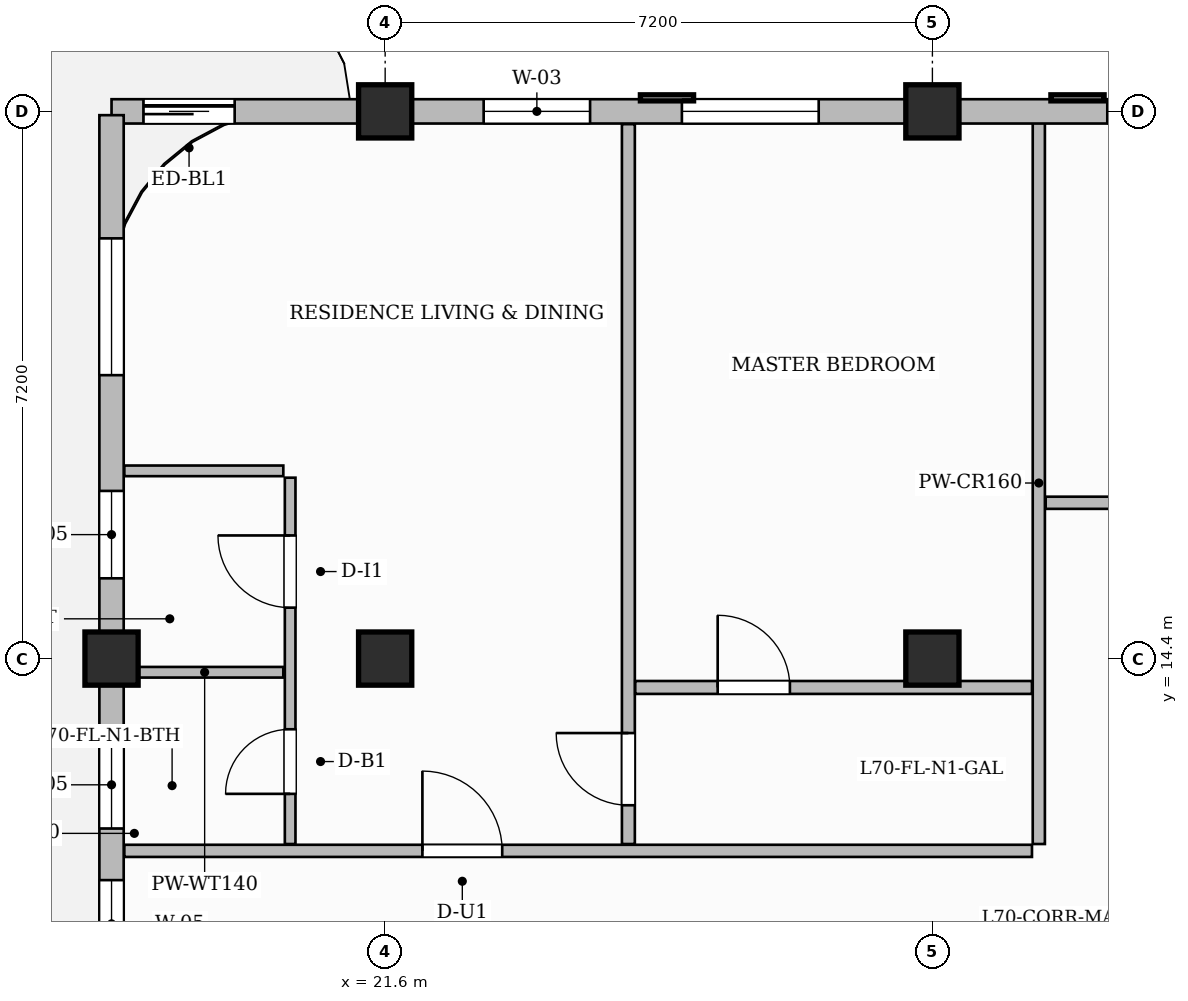
"""IFC4 building model, lengths in metres.
Left out: names, types, materials, properties, quantities, classifications, styles, units other than length and angle.
Written with IfcOpenShell. Run it as: python <this file> out.ifc"""

import sys

from ifc_helpers import new_model, si_unit, direction, frame, frame_2d, origin, origin_2d, place, context, subcontext, project, spatial, rectangle, extrude, source, transform, mapped, element, fill, save


model = new_model("IFC4")
c1 = context("Model", 3, precision=1e-05, world=origin(), true_north=direction((0.0, 1.0)))
c2 = subcontext(c1, "Body", "Model", "MODEL_VIEW")
j1 = project(units=[si_unit("LENGTHUNIT", "METRE"), si_unit("PLANEANGLEUNIT", "RADIAN")], contexts=[c1])
p1 = place(None, origin())
s1 = spatial("IfcSite", under=j1, at=p1, CompositionType="ELEMENT")
p2 = place(p1, origin())
s2 = spatial("IfcBuilding", under=s1, at=p2, CompositionType="ELEMENT")
p3 = place(p2, frame((0.0, 0.0, 278.9)))
s3 = spatial("IfcBuildingStorey", under=s2, at=p3, CompositionType="ELEMENT", Elevation=278.9)
m1 = source(origin(), c2, "Body", "SweptSolid", [
    extrude(rectangle(XDim=0.7, YDim=0.7, at=origin_2d()), origin(), (0.0, 0.0, 1.0), 3.85),
])
for number, where, z_axis, x_axis in (
    (1, (21.6, 14.4, 0.0), (0.0, 0.0, 1.0), (1.0, 0.0, 0.0)),
    (2, (21.6, 21.6, 0.0), (0.0, 0.0, 1.0), (1.0, 0.0, 0.0)),
    (3, (28.8, 14.4, 0.0), (0.0, 0.0, 1.0), (1.0, 0.0, 0.0)),
    (4, (28.8, 21.6, 0.0), (0.0, 0.0, 1.0), (1.0, 0.0, 0.0)),
    (5, (18.0, 14.4, 0.0), (0.0, 0.0, 1.0), (1.0, 0.0, 0.0)),
):
    element("IfcColumn", number, at=place(p3, frame(where, z_axis=z_axis, x_axis=x_axis)), inside=s3, PredefinedType="COLUMN", context=c2, shape_type="MappedRepresentation", body=[
        mapped(m1, transform((0.0, 0.0, 0.0), scale=1.0)),
    ])
p4 = place(p3, frame((18.168, 11.87, 0.0), z_axis=(0.0, 0.0, 1.0), x_axis=(1.0, 0.0, 0.0)))
e6 = element("IfcWall", 6, at=p4, inside=s3, PredefinedType="PARTITIONING", context=c2, shape_type="SweptSolid", body=[
    extrude(rectangle(XDim=11.942, YDim=0.16, at=frame_2d((5.971, 0.0))), origin(), (0.0, 0.0, 1.0), 3.6),
])
p5 = place(p4, frame((3.922, 0.0, 0.0)))
e7 = element("IfcOpeningElement", 7, at=p5, cuts=e6, PredefinedType="OPENING", context=c2, shape_type="SweptSolid", body=[
    extrude(rectangle(XDim=1.05, YDim=2.25, at=frame_2d((0.525, 1.125))), frame((0.0, 0.09, 0.0), z_axis=(0.0, -1.0, 0.0), x_axis=(1.0, 0.0, 0.0)), (0.0, 0.0, 1.0), 0.18),
])
p6 = place(p3, frame((30.2, 11.96, 0.0), z_axis=(0.0, 0.0, 1.0), x_axis=(0.0, 1.0, 0.0)))
e8 = element("IfcWall", 8, at=p6, inside=s3, PredefinedType="PARTITIONING", context=c2, shape_type="SweptSolid", body=[
    extrude(rectangle(XDim=9.5, YDim=0.16, at=frame_2d((4.75, 0.0))), origin(), (0.0, 0.0, 1.0), 3.6),
])
p7 = place(p3, frame((30.29, 16.45, 0.0), z_axis=(0.0, 0.0, 1.0), x_axis=(1.0, 0.0, 0.0)))
e9 = element("IfcWall", 9, at=p7, inside=s3, PredefinedType="PARTITIONING", context=c2, shape_type="SweptSolid", body=[
    extrude(rectangle(XDim=19.37, YDim=0.16, at=frame_2d((9.685, 0.0))), origin(), (0.0, 0.0, 1.0), 3.6),
])
p8 = place(p7, frame((1.285, 0.0, 0.0)))
e10 = element("IfcOpeningElement", 10, at=p8, cuts=e9, PredefinedType="OPENING", context=c2, shape_type="SweptSolid", body=[
    extrude(rectangle(XDim=0.85, YDim=2.1, at=frame_2d((0.425, 1.05))), frame((0.0, 0.09, 0.0), z_axis=(0.0, -1.0, 0.0), x_axis=(1.0, 0.0, 0.0)), (0.0, 0.0, 1.0), 0.18),
])
p9 = place(p7, frame((10.66, 0.0, 0.0)))
e11 = element("IfcOpeningElement", 11, at=p9, cuts=e9, PredefinedType="OPENING", context=c2, shape_type="SweptSolid", body=[
    extrude(rectangle(XDim=1.6, YDim=2.4, at=frame_2d((0.8, 1.2))), frame((0.0, 0.09, 0.0), z_axis=(0.0, -1.0, 0.0), x_axis=(1.0, 0.0, 0.0)), (0.0, 0.0, 1.0), 0.18),
])
p10 = place(p3, frame((20.35, 11.96, 0.0), z_axis=(0.0, 0.0, 1.0), x_axis=(0.0, 1.0, 0.0)))
e12 = element("IfcWall", 12, at=p10, inside=s3, PredefinedType="PARTITIONING", context=c2, shape_type="SweptSolid", body=[
    extrude(rectangle(XDim=4.82, YDim=0.14, at=frame_2d((2.41, 0.0))), origin(), (0.0, 0.0, 1.0), 3.6),
])
p11 = place(p10, frame((0.66, 0.0, 0.0)))
e13 = element("IfcOpeningElement", 13, at=p11, cuts=e12, PredefinedType="OPENING", context=c2, shape_type="SweptSolid", body=[
    extrude(rectangle(XDim=0.85, YDim=2.1, at=frame_2d((0.425, 1.05))), frame((0.0, 0.08, 0.0), z_axis=(0.0, -1.0, 0.0), x_axis=(1.0, 0.0, 0.0)), (0.0, 0.0, 1.0), 0.16),
])
p12 = place(p10, frame((3.11, 0.0, 0.0)))
e14 = element("IfcOpeningElement", 14, at=p12, cuts=e12, PredefinedType="OPENING", context=c2, shape_type="SweptSolid", body=[
    extrude(rectangle(XDim=0.95, YDim=2.15, at=frame_2d((0.475, 1.075))), frame((0.0, 0.08, 0.0), z_axis=(0.0, -1.0, 0.0), x_axis=(1.0, 0.0, 0.0)), (0.0, 0.0, 1.0), 0.16),
])
p13 = place(p3, frame((18.19, 14.22, 0.0), z_axis=(0.0, 0.0, 1.0), x_axis=(1.0, 0.0, 0.0)))
e15 = element("IfcWall", 15, at=p13, inside=s3, PredefinedType="PARTITIONING", context=c2, shape_type="SweptSolid", body=[
    extrude(rectangle(XDim=2.07, YDim=0.14, at=frame_2d((1.035, 0.0))), origin(), (0.0, 0.0, 1.0), 3.185),
])
p14 = place(p3, frame((18.168, 16.87, 0.0), z_axis=(0.0, 0.0, 1.0), x_axis=(1.0, 0.0, 0.0)))
e16 = element("IfcWall", 16, at=p14, inside=s3, PredefinedType="PARTITIONING", context=c2, shape_type="SweptSolid", body=[
    extrude(rectangle(XDim=2.092, YDim=0.14, at=frame_2d((1.046, 0.0))), origin(), (0.0, 0.0, 1.0), 3.6),
])
p15 = place(p3, frame((24.8, 11.96, 0.0), z_axis=(0.0, 0.0, 1.0), x_axis=(0.0, 1.0, 0.0)))
e17 = element("IfcWall", 17, at=p15, inside=s3, PredefinedType="PARTITIONING", context=c2, shape_type="SweptSolid", body=[
    extrude(rectangle(XDim=9.472, YDim=0.17, at=frame_2d((4.736, 0.0))), origin(), (0.0, 0.0, 1.0), 3.6),
])
p16 = place(p15, frame((0.51, 0.0, 0.0)))
e18 = element("IfcOpeningElement", 18, at=p16, cuts=e17, PredefinedType="OPENING", context=c2, shape_type="SweptSolid", body=[
    extrude(rectangle(XDim=0.95, YDim=2.15, at=frame_2d((0.475, 1.075))), frame((0.0, 0.095, 0.0), z_axis=(0.0, -1.0, 0.0), x_axis=(1.0, 0.0, 0.0)), (0.0, 0.0, 1.0), 0.19),
])
p17 = place(p3, frame((24.89, 14.02, 0.0), z_axis=(0.0, 0.0, 1.0), x_axis=(1.0, 0.0, 0.0)))
e19 = element("IfcWall", 19, at=p17, inside=s3, PredefinedType="PARTITIONING", context=c2, shape_type="SweptSolid", body=[
    extrude(rectangle(XDim=5.22, YDim=0.17, at=frame_2d((2.61, 0.0))), origin(), (0.0, 0.0, 1.0), 3.6),
])
p18 = place(p17, frame((1.085, 0.0, 0.0)))
e20 = element("IfcOpeningElement", 20, at=p18, cuts=e19, PredefinedType="OPENING", context=c2, shape_type="SweptSolid", body=[
    extrude(rectangle(XDim=0.95, YDim=2.15, at=frame_2d((0.475, 1.075))), frame((0.0, 0.095, 0.0), z_axis=(0.0, -1.0, 0.0), x_axis=(1.0, 0.0, 0.0)), (0.0, 0.0, 1.0), 0.19),
])
p19 = place(p3, frame((18.0, 21.6, 0.0), z_axis=(0.0, 0.0, 1.0), x_axis=(1.0, 0.0, 0.0)))
e21 = element("IfcWall", 21, at=p19, inside=s3, PredefinedType="SOLIDWALL", context=c2, shape_type="SweptSolid", body=[
    extrude(rectangle(XDim=31.8, YDim=0.32, at=frame_2d((15.9, 0.0))), origin(), (0.0, 0.0, 1.0), 3.185),
])
p20 = place(p19, frame((0.42, 0.0, 0.0)))
e22 = element("IfcOpeningElement", 22, at=p20, cuts=e21, PredefinedType="OPENING", context=c2, shape_type="SweptSolid", body=[
    extrude(rectangle(XDim=1.2, YDim=2.2, at=frame_2d((0.6, 1.1))), frame((0.0, 0.17, 0.0), z_axis=(0.0, -1.0, 0.0), x_axis=(1.0, 0.0, 0.0)), (0.0, 0.0, 1.0), 0.34),
])
p21 = place(p19, frame((4.896, 0.0, 0.8)))
e23 = element("IfcOpeningElement", 23, at=p21, cuts=e21, PredefinedType="OPENING", context=c2, shape_type="SweptSolid", body=[
    extrude(rectangle(XDim=1.4, YDim=1.85, at=frame_2d((0.7, 0.925))), frame((0.0, 0.17, 0.0), z_axis=(0.0, -1.0, 0.0), x_axis=(1.0, 0.0, 0.0)), (0.0, 0.0, 1.0), 0.34),
])
p22 = place(p19, frame((7.504, 0.0, 0.8)))
e24 = element("IfcOpeningElement", 24, at=p22, cuts=e21, PredefinedType="OPENING", context=c2, shape_type="SweptSolid", body=[
    extrude(rectangle(XDim=1.8, YDim=1.85, at=frame_2d((0.9, 0.925))), frame((0.0, 0.17, 0.0), z_axis=(0.0, -1.0, 0.0), x_axis=(1.0, 0.0, 0.0)), (0.0, 0.0, 1.0), 0.34),
])
p23 = place(p19, frame((13.101, 0.0, 0.8)))
e25 = element("IfcOpeningElement", 25, at=p23, cuts=e21, PredefinedType="OPENING", context=c2, shape_type="SweptSolid", body=[
    extrude(rectangle(XDim=1.8, YDim=1.85, at=frame_2d((0.9, 0.925))), frame((0.0, 0.17, 0.0), z_axis=(0.0, -1.0, 0.0), x_axis=(1.0, 0.0, 0.0)), (0.0, 0.0, 1.0), 0.34),
])
p24 = place(p19, frame((18.125, 0.0, 0.8)))
e26 = element("IfcOpeningElement", 26, at=p24, cuts=e21, PredefinedType="OPENING", context=c2, shape_type="SweptSolid", body=[
    extrude(rectangle(XDim=1.8, YDim=1.85, at=frame_2d((0.9, 0.925))), frame((0.0, 0.17, 0.0), z_axis=(0.0, -1.0, 0.0), x_axis=(1.0, 0.0, 0.0)), (0.0, 0.0, 1.0), 0.34),
])
p25 = place(p19, frame((20.875, 0.0, 0.8)))
e27 = element("IfcOpeningElement", 27, at=p25, cuts=e21, PredefinedType="OPENING", context=c2, shape_type="SweptSolid", body=[
    extrude(rectangle(XDim=1.8, YDim=1.85, at=frame_2d((0.9, 0.925))), frame((0.0, 0.17, 0.0), z_axis=(0.0, -1.0, 0.0), x_axis=(1.0, 0.0, 0.0)), (0.0, 0.0, 1.0), 0.34),
])
p26 = place(p19, frame((25.475, 0.0, 0.8)))
e28 = element("IfcOpeningElement", 28, at=p26, cuts=e21, PredefinedType="OPENING", context=c2, shape_type="SweptSolid", body=[
    extrude(rectangle(XDim=1.8, YDim=1.85, at=frame_2d((0.9, 0.925))), frame((0.0, 0.17, 0.0), z_axis=(0.0, -1.0, 0.0), x_axis=(1.0, 0.0, 0.0)), (0.0, 0.0, 1.0), 0.34),
])
p27 = place(p19, frame((28.525, 0.0, 0.8)))
e29 = element("IfcOpeningElement", 29, at=p27, cuts=e21, PredefinedType="OPENING", context=c2, shape_type="SweptSolid", body=[
    extrude(rectangle(XDim=1.8, YDim=1.85, at=frame_2d((0.9, 0.925))), frame((0.0, 0.17, 0.0), z_axis=(0.0, -1.0, 0.0), x_axis=(1.0, 0.0, 0.0)), (0.0, 0.0, 1.0), 0.34),
])
p28 = place(p3, frame((18.0, 0.05, 0.0), z_axis=(0.0, 0.0, 1.0), x_axis=(0.0, 1.0, 0.0)))
e30 = element("IfcWall", 30, at=p28, inside=s3, PredefinedType="SOLIDWALL", context=c2, shape_type="SweptSolid", body=[
    extrude(rectangle(XDim=21.5, YDim=0.32, at=frame_2d((10.75, 0.0))), origin(), (0.0, 0.0, 1.0), 3.6),
])
p29 = place(p28, frame((0.99, 0.0, 0.8)))
e31 = element("IfcOpeningElement", 31, at=p29, cuts=e30, PredefinedType="OPENING", context=c2, shape_type="SweptSolid", body=[
    extrude(rectangle(XDim=1.8, YDim=1.85, at=frame_2d((0.9, 0.925))), frame((0.0, 0.17, 0.0), z_axis=(0.0, -1.0, 0.0), x_axis=(1.0, 0.0, 0.0)), (0.0, 0.0, 1.0), 0.34),
])
p30 = place(p28, frame((3.93, 0.0, 0.8)))
e32 = element("IfcOpeningElement", 32, at=p30, cuts=e30, PredefinedType="OPENING", context=c2, shape_type="SweptSolid", body=[
    extrude(rectangle(XDim=1.8, YDim=1.85, at=frame_2d((0.9, 0.925))), frame((0.0, 0.17, 0.0), z_axis=(0.0, -1.0, 0.0), x_axis=(1.0, 0.0, 0.0)), (0.0, 0.0, 1.0), 0.34),
])
p31 = place(p28, frame((8.346, 0.0, 0.8)))
e33 = element("IfcOpeningElement", 33, at=p31, cuts=e30, PredefinedType="OPENING", context=c2, shape_type="SweptSolid", body=[
    extrude(rectangle(XDim=1.15, YDim=1.8, at=frame_2d((0.575, 0.9))), frame((0.0, 0.17, 0.0), z_axis=(0.0, -1.0, 0.0), x_axis=(1.0, 0.0, 0.0)), (0.0, 0.0, 1.0), 0.34),
])
p32 = place(p28, frame((10.285, 0.0, 0.8)))
e34 = element("IfcOpeningElement", 34, at=p32, cuts=e30, PredefinedType="OPENING", context=c2, shape_type="SweptSolid", body=[
    extrude(rectangle(XDim=1.15, YDim=1.8, at=frame_2d((0.575, 0.9))), frame((0.0, 0.17, 0.0), z_axis=(0.0, -1.0, 0.0), x_axis=(1.0, 0.0, 0.0)), (0.0, 0.0, 1.0), 0.34),
])
p33 = place(p28, frame((12.114, 0.0, 0.8)))
e35 = element("IfcOpeningElement", 35, at=p33, cuts=e30, PredefinedType="OPENING", context=c2, shape_type="SweptSolid", body=[
    extrude(rectangle(XDim=1.15, YDim=1.8, at=frame_2d((0.575, 0.9))), frame((0.0, 0.17, 0.0), z_axis=(0.0, -1.0, 0.0), x_axis=(1.0, 0.0, 0.0)), (0.0, 0.0, 1.0), 0.34),
])
p34 = place(p28, frame((15.406, 0.0, 0.8)))
e36 = element("IfcOpeningElement", 36, at=p34, cuts=e30, PredefinedType="OPENING", context=c2, shape_type="SweptSolid", body=[
    extrude(rectangle(XDim=1.15, YDim=1.8, at=frame_2d((0.575, 0.9))), frame((0.0, 0.17, 0.0), z_axis=(0.0, -1.0, 0.0), x_axis=(1.0, 0.0, 0.0)), (0.0, 0.0, 1.0), 0.34),
])
p35 = place(p28, frame((18.079, 0.0, 0.8)))
e37 = element("IfcOpeningElement", 37, at=p35, cuts=e30, PredefinedType="OPENING", context=c2, shape_type="SweptSolid", body=[
    extrude(rectangle(XDim=1.8, YDim=1.85, at=frame_2d((0.9, 0.925))), frame((0.0, 0.17, 0.0), z_axis=(0.0, -1.0, 0.0), x_axis=(1.0, 0.0, 0.0)), (0.0, 0.0, 1.0), 0.34),
])
m2 = source(origin(), c2, "Body", "SweptSolid", [
    extrude(rectangle(XDim=0.85, YDim=2.1, at=frame_2d((0.425, 1.05))), frame((0.0, 0.025, 0.0), z_axis=(0.0, -1.0, 0.0), x_axis=(1.0, 0.0, 0.0)), (0.0, 0.0, 1.0), 0.05),
])
p36 = place(p11, origin())
e38 = element("IfcDoor", 38, at=p36, inside=s3, OperationType="SINGLE_SWING_LEFT", PredefinedType="DOOR", context=c2, shape_type="MappedRepresentation", body=[
    mapped(m2, transform((0.0, 0.0, 0.0), scale=1.0)),
])
fill(e13, e38)
m3 = source(origin(), c2, "Body", "SweptSolid", [
    extrude(rectangle(XDim=0.95, YDim=2.15, at=frame_2d((0.475, 1.075))), frame((0.0, 0.025, 0.0), z_axis=(0.0, -1.0, 0.0), x_axis=(1.0, 0.0, 0.0)), (0.0, 0.0, 1.0), 0.05),
])
p37 = place(p12, origin())
e39 = element("IfcDoor", 39, at=p37, inside=s3, OperationType="SINGLE_SWING_RIGHT", PredefinedType="DOOR", context=c2, shape_type="MappedRepresentation", body=[
    mapped(m3, transform((0.0, 0.0, 0.0), scale=1.0)),
])
fill(e14, e39)
m4 = source(origin(), c2, "Body", "SweptSolid", [
    extrude(rectangle(XDim=1.05, YDim=2.25, at=frame_2d((0.525, 1.125))), frame((0.0, 0.025, 0.0), z_axis=(0.0, -1.0, 0.0), x_axis=(1.0, 0.0, 0.0)), (0.0, 0.0, 1.0), 0.05),
])
p38 = place(p5, origin())
e40 = element("IfcDoor", 40, at=p38, inside=s3, OperationType="SINGLE_SWING_LEFT", PredefinedType="DOOR", context=c2, shape_type="MappedRepresentation", body=[
    mapped(m4, transform((0.0, 0.0, 0.0), scale=1.0)),
])
fill(e7, e40)
p39 = place(p16, origin())
e41 = element("IfcDoor", 41, at=p39, inside=s3, OperationType="SINGLE_SWING_RIGHT", PredefinedType="DOOR", context=c2, shape_type="MappedRepresentation", body=[
    mapped(m3, transform((0.0, 0.0, 0.0), scale=1.0)),
])
fill(e18, e41)
p40 = place(p18, origin())
e42 = element("IfcDoor", 42, at=p40, inside=s3, OperationType="SINGLE_SWING_LEFT", PredefinedType="DOOR", context=c2, shape_type="MappedRepresentation", body=[
    mapped(m3, transform((0.0, 0.0, 0.0), scale=1.0)),
])
fill(e20, e42)
m5 = source(origin(), c2, "Body", "SweptSolid", [
    extrude(rectangle(XDim=1.2, YDim=2.2, at=frame_2d((0.6, 1.1))), frame((0.0, 0.025, 0.0), z_axis=(0.0, -1.0, 0.0), x_axis=(1.0, 0.0, 0.0)), (0.0, 0.0, 1.0), 0.05),
])
p41 = place(p20, origin())
e43 = element("IfcDoor", 43, at=p41, inside=s3, OperationType="SLIDING_TO_LEFT", PredefinedType="DOOR", context=c2, shape_type="MappedRepresentation", body=[
    mapped(m5, transform((0.0, 0.0, 0.0), scale=1.0)),
])
fill(e22, e43)
m6 = source(origin(), c2, "Body", "SweptSolid", [
    extrude(rectangle(XDim=1.4, YDim=1.85, at=frame_2d((0.7, 0.925))), frame((0.0, 0.03, 0.0), z_axis=(0.0, -1.0, 0.0), x_axis=(1.0, 0.0, 0.0)), (0.0, 0.0, 1.0), 0.06),
])
p42 = place(p21, origin())
e44 = element("IfcWindow", 44, at=p42, inside=s3, PartitioningType="SINGLE_PANEL", PredefinedType="WINDOW", context=c2, shape_type="MappedRepresentation", body=[
    mapped(m6, transform((0.0, 0.0, 0.0), scale=1.0)),
])
fill(e23, e44)
m7 = source(origin(), c2, "Body", "SweptSolid", [
    extrude(rectangle(XDim=1.8, YDim=1.85, at=frame_2d((0.9, 0.925))), frame((0.0, 0.03, 0.0), z_axis=(0.0, -1.0, 0.0), x_axis=(1.0, 0.0, 0.0)), (0.0, 0.0, 1.0), 0.06),
])
p43 = place(p22, origin())
e45 = element("IfcWindow", 45, at=p43, inside=s3, PartitioningType="DOUBLE_PANEL_VERTICAL", PredefinedType="WINDOW", context=c2, shape_type="MappedRepresentation", body=[
    mapped(m7, transform((0.0, 0.0, 0.0), scale=1.0)),
])
fill(e24, e45)
p44 = place(p23, origin())
e46 = element("IfcWindow", 46, at=p44, inside=s3, PartitioningType="DOUBLE_PANEL_VERTICAL", PredefinedType="WINDOW", context=c2, shape_type="MappedRepresentation", body=[
    mapped(m7, transform((0.0, 0.0, 0.0), scale=1.0)),
])
fill(e25, e46)
m8 = source(origin(), c2, "Body", "SweptSolid", [
    extrude(rectangle(XDim=1.15, YDim=1.8, at=frame_2d((0.575, 0.9))), frame((0.0, 0.03, 0.0), z_axis=(0.0, -1.0, 0.0), x_axis=(1.0, 0.0, 0.0)), (0.0, 0.0, 1.0), 0.06),
])
p45 = place(p32, origin())
e47 = element("IfcWindow", 47, at=p45, inside=s3, PartitioningType="SINGLE_PANEL", PredefinedType="WINDOW", context=c2, shape_type="MappedRepresentation", body=[
    mapped(m8, transform((0.0, 0.0, 0.0), scale=1.0)),
])
fill(e34, e47)
p46 = place(p33, origin())
e48 = element("IfcWindow", 48, at=p46, inside=s3, PartitioningType="SINGLE_PANEL", PredefinedType="WINDOW", context=c2, shape_type="MappedRepresentation", body=[
    mapped(m8, transform((0.0, 0.0, 0.0), scale=1.0)),
])
fill(e35, e48)
p47 = place(p34, origin())
e49 = element("IfcWindow", 49, at=p47, inside=s3, PartitioningType="SINGLE_PANEL", PredefinedType="WINDOW", context=c2, shape_type="MappedRepresentation", body=[
    mapped(m8, transform((0.0, 0.0, 0.0), scale=1.0)),
])
fill(e36, e49)
p48 = place(p35, origin())
e50 = element("IfcWindow", 50, at=p48, inside=s3, PartitioningType="DOUBLE_PANEL_VERTICAL", PredefinedType="WINDOW", context=c2, shape_type="MappedRepresentation", body=[
    mapped(m7, transform((0.0, 0.0, 0.0), scale=1.0)),
])
fill(e37, e50)
save(model, sys.argv[1])
